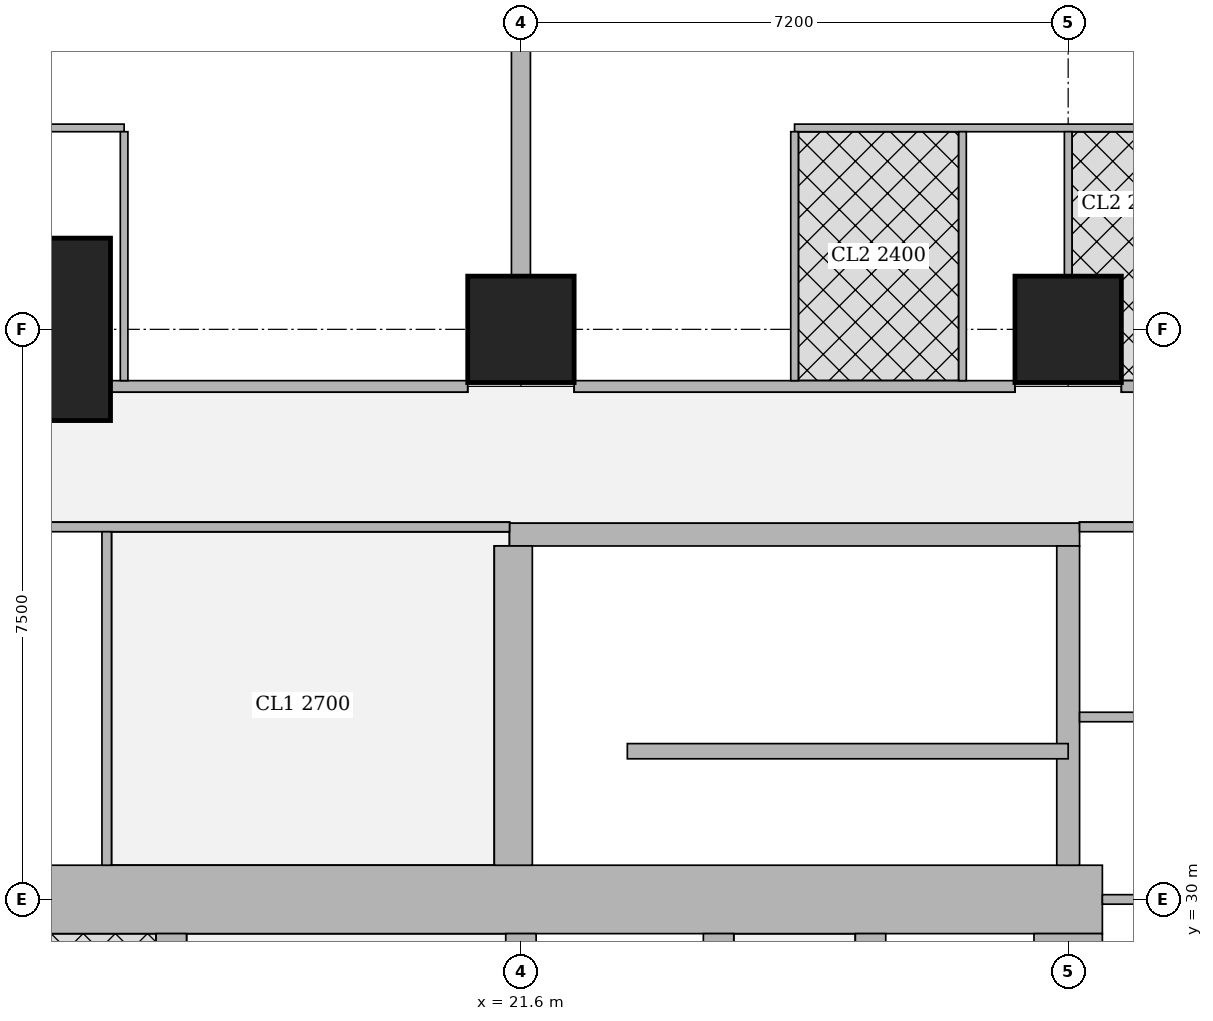
"""IFC4 building model, lengths in metres.
Left out: names, types, materials, properties, quantities, classifications, styles, units other than length and angle.
Written with IfcOpenShell. Run it as: python <this file> out.ifc"""

import sys

from ifc_helpers import new_model, si_unit, direction, frame, frame_2d, origin, origin_2d, place, context, subcontext, project, spatial, rectangle, extrude, element, fill, save


model = new_model("IFC4")
c1 = context("Model", 3, precision=1e-05, world=origin(), true_north=direction((0.0, 1.0)))
c2 = subcontext(c1, "Body", "Model", "MODEL_VIEW")
j1 = project(units=[si_unit("LENGTHUNIT", "METRE"), si_unit("PLANEANGLEUNIT", "RADIAN")], contexts=[c1])
p1 = place(None, origin())
s1 = spatial("IfcSite", under=j1, at=p1, CompositionType="ELEMENT")
p2 = place(p1, origin())
s2 = spatial("IfcBuilding", under=s1, at=p2, CompositionType="ELEMENT")
p3 = place(p2, frame((0.0, 0.0, 234.95)))
s3 = spatial("IfcBuildingStorey", under=s2, at=p3, CompositionType="ELEMENT", Elevation=234.95)
p4 = place(p3, frame((15.0, 37.5, 0.0), z_axis=(0.0, 0.0, 1.0), x_axis=(1.0, 0.0, 0.0)))
e1 = element("IfcColumn", 1, at=p4, inside=s3, PredefinedType="COLUMN", context=c2, shape_type="SweptSolid", body=[
    extrude(rectangle(XDim=2.4, YDim=2.4, at=origin_2d()), origin(), (0.0, 0.0, 1.0), 3.75),
])
for number, where, z_axis, x_axis in (
    (2, (21.6, 37.5, 0.0), (0.0, 0.0, 1.0), (1.0, 0.0, 0.0)),
    (3, (28.8, 37.5, 0.0), (0.0, 0.0, 1.0), (1.0, 0.0, 0.0)),
):
    element("IfcColumn", number, at=place(p3, frame(where, z_axis=z_axis, x_axis=x_axis)), inside=s3, PredefinedType="COLUMN", context=c2, shape_type="SweptSolid", body=[
        extrude(rectangle(XDim=1.4, YDim=1.4, at=origin_2d()), origin(), (0.0, 0.0, 1.0), 3.75),
    ])
p5 = place(p3, frame((13.95, 30.0, 0.0), z_axis=(0.0, 0.0, 1.0), x_axis=(1.0, 0.0, 0.0)))
e4 = element("IfcWall", 4, at=p5, inside=s3, PredefinedType="SHEAR", context=c2, shape_type="SweptSolid", body=[
    extrude(rectangle(XDim=15.3, YDim=0.9, at=frame_2d((7.65, 0.0))), origin(), (0.0, 0.0, 1.0), 3.75),
])
p6 = place(p5, frame((4.45, 0.0, 0.0)))
e5 = element("IfcOpeningElement", 5, at=p6, cuts=e4, PredefinedType="OPENING", context=c2, shape_type="SweptSolid", body=[
    extrude(rectangle(XDim=1.8, YDim=2.1, at=frame_2d((0.9, 1.05))), frame((0.0, 0.46, 0.0), z_axis=(0.0, -1.0, 0.0), x_axis=(1.0, 0.0, 0.0)), (0.0, 0.0, 1.0), 0.92),
])
p7 = place(p5, frame((10.7, 0.0, 0.0)))
e6 = element("IfcOpeningElement", 6, at=p7, cuts=e4, PredefinedType="OPENING", context=c2, shape_type="SweptSolid", body=[
    extrude(rectangle(XDim=1.1, YDim=2.1, at=frame_2d((0.55, 1.05))), frame((0.0, 0.46, 0.0), z_axis=(0.0, -1.0, 0.0), x_axis=(1.0, 0.0, 0.0)), (0.0, 0.0, 1.0), 0.92),
])
p8 = place(p3, frame((28.8, 15.45, 0.0), z_axis=(0.0, 0.0, 1.0), x_axis=(0.0, 1.0, 0.0)))
e7 = element("IfcWall", 7, at=p8, inside=s3, PredefinedType="SHEAR", context=c2, shape_type="SweptSolid", body=[
    extrude(rectangle(XDim=14.1, YDim=0.9, at=frame_2d((7.05, 0.0))), origin(), (0.0, 0.0, 1.0), 3.75),
])
p9 = place(p3, frame((17.0, 15.45, 0.0), z_axis=(0.0, 0.0, 1.0), x_axis=(0.0, 1.0, 0.0)))
e8 = element("IfcWall", 8, at=p9, inside=s3, PredefinedType="SHEAR", context=c2, shape_type="SweptSolid", body=[
    extrude(rectangle(XDim=14.1, YDim=0.4, at=frame_2d((7.05, 0.0))), origin(), (0.0, 0.0, 1.0), 3.75),
])
p10 = place(p9, frame((1.05, 0.0, 0.0)))
e9 = element("IfcOpeningElement", 9, at=p10, cuts=e8, PredefinedType="OPENING", context=c2, shape_type="SweptSolid", body=[
    extrude(rectangle(XDim=1.0, YDim=2.1, at=frame_2d((0.5, 1.05))), frame((0.0, 0.21, 0.0), z_axis=(0.0, -1.0, 0.0), x_axis=(1.0, 0.0, 0.0)), (0.0, 0.0, 1.0), 0.42),
])
p11 = place(p9, frame((4.675, 0.0, 0.0)))
e10 = element("IfcOpeningElement", 10, at=p11, cuts=e8, PredefinedType="OPENING", context=c2, shape_type="SweptSolid", body=[
    extrude(rectangle(XDim=1.0, YDim=2.1, at=frame_2d((0.5, 1.05))), frame((0.0, 0.21, 0.0), z_axis=(0.0, -1.0, 0.0), x_axis=(1.0, 0.0, 0.0)), (0.0, 0.0, 1.0), 0.42),
])
p12 = place(p9, frame((8.425, 0.0, 0.0)))
e11 = element("IfcOpeningElement", 11, at=p12, cuts=e8, PredefinedType="OPENING", context=c2, shape_type="SweptSolid", body=[
    extrude(rectangle(XDim=1.0, YDim=2.1, at=frame_2d((0.5, 1.05))), frame((0.0, 0.21, 0.0), z_axis=(0.0, -1.0, 0.0), x_axis=(1.0, 0.0, 0.0)), (0.0, 0.0, 1.0), 0.42),
])
p13 = place(p9, frame((12.175, 0.0, 0.0)))
e12 = element("IfcOpeningElement", 12, at=p13, cuts=e8, PredefinedType="OPENING", context=c2, shape_type="SweptSolid", body=[
    extrude(rectangle(XDim=1.0, YDim=2.1, at=frame_2d((0.5, 1.05))), frame((0.0, 0.21, 0.0), z_axis=(0.0, -1.0, 0.0), x_axis=(1.0, 0.0, 0.0)), (0.0, 0.0, 1.0), 0.42),
])
p14 = place(p3, frame((21.6, 15.45, 0.0), z_axis=(0.0, 0.0, 1.0), x_axis=(0.0, 1.0, 0.0)))
e13 = element("IfcWall", 13, at=p14, inside=s3, PredefinedType="SHEAR", context=c2, shape_type="SweptSolid", body=[
    extrude(rectangle(XDim=14.1, YDim=0.4, at=frame_2d((7.05, 0.0))), origin(), (0.0, 0.0, 1.0), 3.75),
])
p15 = place(p14, frame((0.875, 0.0, 0.0)))
e14 = element("IfcOpeningElement", 14, at=p15, cuts=e13, PredefinedType="OPENING", context=c2, shape_type="SweptSolid", body=[
    extrude(rectangle(XDim=1.1, YDim=2.1, at=frame_2d((0.55, 1.05))), frame((0.0, 0.21, 0.0), z_axis=(0.0, -1.0, 0.0), x_axis=(1.0, 0.0, 0.0)), (0.0, 0.0, 1.0), 0.42),
])
p16 = place(p14, frame((4.625, 0.0, 0.0)))
e15 = element("IfcOpeningElement", 15, at=p16, cuts=e13, PredefinedType="OPENING", context=c2, shape_type="SweptSolid", body=[
    extrude(rectangle(XDim=1.1, YDim=2.1, at=frame_2d((0.55, 1.05))), frame((0.0, 0.21, 0.0), z_axis=(0.0, -1.0, 0.0), x_axis=(1.0, 0.0, 0.0)), (0.0, 0.0, 1.0), 0.42),
])
p17 = place(p14, frame((8.375, 0.0, 0.0)))
e16 = element("IfcOpeningElement", 16, at=p17, cuts=e13, PredefinedType="OPENING", context=c2, shape_type="SweptSolid", body=[
    extrude(rectangle(XDim=1.1, YDim=2.1, at=frame_2d((0.55, 1.05))), frame((0.0, 0.21, 0.0), z_axis=(0.0, -1.0, 0.0), x_axis=(1.0, 0.0, 0.0)), (0.0, 0.0, 1.0), 0.42),
])
p18 = place(p14, frame((12.125, 0.0, 0.0)))
e17 = element("IfcOpeningElement", 17, at=p18, cuts=e13, PredefinedType="OPENING", context=c2, shape_type="SweptSolid", body=[
    extrude(rectangle(XDim=1.1, YDim=2.1, at=frame_2d((0.55, 1.05))), frame((0.0, 0.21, 0.0), z_axis=(0.0, -1.0, 0.0), x_axis=(1.0, 0.0, 0.0)), (0.0, 0.0, 1.0), 0.42),
])
p19 = place(p3, frame((24.2, 15.45, 0.0), z_axis=(0.0, 0.0, 1.0), x_axis=(0.0, 1.0, 0.0)))
e18 = element("IfcWall", 18, at=p19, inside=s3, PredefinedType="SHEAR", context=c2, shape_type="SweptSolid", body=[
    extrude(rectangle(XDim=14.1, YDim=0.4, at=frame_2d((7.05, 0.0))), origin(), (0.0, 0.0, 1.0), 3.75),
])
p20 = place(p3, frame((26.2, 26.45, 0.0), z_axis=(0.0, 0.0, 1.0), x_axis=(0.0, 1.0, 0.0)))
e19 = element("IfcWall", 19, at=p20, inside=s3, PredefinedType="SHEAR", context=c2, shape_type="SweptSolid", body=[
    extrude(rectangle(XDim=3.1, YDim=0.4, at=frame_2d((1.55, 0.0))), origin(), (0.0, 0.0, 1.0), 3.75),
])
p21 = place(p20, frame((1.075, 0.0, 0.0)))
e20 = element("IfcOpeningElement", 20, at=p21, cuts=e19, PredefinedType="OPENING", context=c2, shape_type="SweptSolid", body=[
    extrude(rectangle(XDim=1.2, YDim=2.1, at=frame_2d((0.6, 1.05))), frame((0.0, 0.21, 0.0), z_axis=(0.0, -1.0, 0.0), x_axis=(1.0, 0.0, 0.0)), (0.0, 0.0, 1.0), 0.42),
])
p22 = place(p3, frame((21.45, 34.8, 0.0), z_axis=(0.0, 0.0, 1.0), x_axis=(1.0, 0.0, 0.0)))
e21 = element("IfcWall", 21, at=p22, inside=s3, PredefinedType="SHEAR", context=c2, shape_type="SweptSolid", body=[
    extrude(rectangle(XDim=7.5, YDim=0.3, at=frame_2d((3.75, 0.0))), origin(), (0.0, 0.0, 1.0), 3.75),
])
p23 = place(p22, frame((0.5, 0.0, 0.0)))
e22 = element("IfcOpeningElement", 22, at=p23, cuts=e21, PredefinedType="OPENING", context=c2, shape_type="SweptSolid", body=[
    extrude(rectangle(XDim=1.1, YDim=2.1, at=frame_2d((0.55, 1.05))), frame((0.0, 0.16, 0.0), z_axis=(0.0, -1.0, 0.0), x_axis=(1.0, 0.0, 0.0)), (0.0, 0.0, 1.0), 0.32),
])
p24 = place(p3, frame((21.5, 30.45, 0.0), z_axis=(0.0, 0.0, 1.0), x_axis=(0.0, 1.0, 0.0)))
e23 = element("IfcWall", 23, at=p24, inside=s3, PredefinedType="SHEAR", context=c2, shape_type="SweptSolid", body=[
    extrude(rectangle(XDim=4.2, YDim=0.5, at=frame_2d((2.1, 0.0))), origin(), (0.0, 0.0, 1.0), 3.75),
])
p25 = place(p3, frame((28.8, 30.45, 0.0), z_axis=(0.0, 0.0, 1.0), x_axis=(0.0, 1.0, 0.0)))
e24 = element("IfcWall", 24, at=p25, inside=s3, PredefinedType="SHEAR", context=c2, shape_type="SweptSolid", body=[
    extrude(rectangle(XDim=4.2, YDim=0.3, at=frame_2d((2.1, 0.0))), origin(), (0.0, 0.0, 1.0), 3.75),
])
p26 = place(p3, frame((16.201, 36.75, 0.0), z_axis=(0.0, 0.0, 1.0), x_axis=(1.0, 0.0, 0.0)))
e25 = element("IfcWall", 25, at=p26, inside=s3, PredefinedType="SOLIDWALL", context=c2, shape_type="SweptSolid", body=[
    extrude(rectangle(XDim=4.698, YDim=0.15, at=frame_2d((2.349, 0.0))), origin(), (0.0, 0.0, 1.0), 3.5),
])
p27 = place(p26, frame((0.353, 0.0, 0.0)))
e26 = element("IfcOpeningElement", 26, at=p27, cuts=e25, PredefinedType="OPENING", context=c2, shape_type="SweptSolid", body=[
    extrude(rectangle(XDim=1.0, YDim=2.1, at=frame_2d((0.5, 1.05))), frame((0.0, 0.085, 0.0), z_axis=(0.0, -1.0, 0.0), x_axis=(1.0, 0.0, 0.0)), (0.0, 0.0, 1.0), 0.17),
])
p28 = place(p3, frame((22.301, 36.75, 0.0), z_axis=(0.0, 0.0, 1.0), x_axis=(1.0, 0.0, 0.0)))
e27 = element("IfcWall", 27, at=p28, inside=s3, PredefinedType="SOLIDWALL", context=c2, shape_type="SweptSolid", body=[
    extrude(rectangle(XDim=5.798, YDim=0.15, at=frame_2d((2.899, 0.0))), origin(), (0.0, 0.0, 1.0), 3.5),
])
p29 = place(p28, frame((0.799, 0.0, 0.0)))
e28 = element("IfcOpeningElement", 28, at=p29, cuts=e27, PredefinedType="OPENING", context=c2, shape_type="SweptSolid", body=[
    extrude(rectangle(XDim=1.0, YDim=2.1, at=frame_2d((0.5, 1.05))), frame((0.0, 0.085, 0.0), z_axis=(0.0, -1.0, 0.0), x_axis=(1.0, 0.0, 0.0)), (0.0, 0.0, 1.0), 0.17),
])
p30 = place(p3, frame((29.501, 36.75, 0.0), z_axis=(0.0, 0.0, 1.0), x_axis=(1.0, 0.0, 0.0)))
e29 = element("IfcWall", 29, at=p30, inside=s3, PredefinedType="SOLIDWALL", context=c2, shape_type="SweptSolid", body=[
    extrude(rectangle(XDim=5.471, YDim=0.15, at=frame_2d((2.735, 0.0))), origin(), (0.0, 0.0, 1.0), 3.5),
])
p31 = place(p3, frame((13.75, 40.15, 0.0), z_axis=(0.0, 0.0, 1.0), x_axis=(1.0, 0.0, 0.0)))
e30 = element("IfcWall", 30, at=p31, inside=s3, PredefinedType="PARTITIONING", context=c2, shape_type="SweptSolid", body=[
    extrude(rectangle(XDim=2.629, YDim=0.1, at=frame_2d((1.314, 0.0))), origin(), (0.0, 0.0, 1.0), 2.05),
])
p32 = place(p3, frame((16.379, 36.825, 0.0), z_axis=(0.0, 0.0, 1.0), x_axis=(0.0, 1.0, 0.0)))
e31 = element("IfcWall", 31, at=p32, inside=s3, PredefinedType="PARTITIONING", context=c2, shape_type="SweptSolid", body=[
    extrude(rectangle(XDim=3.275, YDim=0.1, at=frame_2d((1.638, 0.0))), origin(), (0.0, 0.0, 1.0), 3.5),
])
p33 = place(p32, frame((2.225, 0.0, 0.0)))
e32 = element("IfcOpeningElement", 32, at=p33, cuts=e31, PredefinedType="OPENING", context=c2, shape_type="SweptSolid", body=[
    extrude(rectangle(XDim=0.9, YDim=2.1, at=frame_2d((0.45, 1.05))), frame((0.0, 0.06, 0.0), z_axis=(0.0, -1.0, 0.0), x_axis=(1.0, 0.0, 0.0)), (0.0, 0.0, 1.0), 0.12),
])
p34 = place(p3, frame((25.2, 40.15, 0.0), z_axis=(0.0, 0.0, 1.0), x_axis=(1.0, 0.0, 0.0)))
e33 = element("IfcWall", 33, at=p34, inside=s3, PredefinedType="PARTITIONING", context=c2, shape_type="SweptSolid", body=[
    extrude(rectangle(XDim=9.135, YDim=0.1, at=frame_2d((4.567, 0.0))), origin(), (0.0, 0.0, 1.0), 3.5),
])
p35 = place(p34, frame((0.655, 0.0, 0.0)))
e34 = element("IfcOpeningElement", 34, at=p35, cuts=e33, PredefinedType="OPENING", context=c2, shape_type="SweptSolid", body=[
    extrude(rectangle(XDim=0.9, YDim=2.1, at=frame_2d((0.45, 1.05))), frame((0.0, 0.06, 0.0), z_axis=(0.0, -1.0, 0.0), x_axis=(1.0, 0.0, 0.0)), (0.0, 0.0, 1.0), 0.12),
])
p36 = place(p34, frame((3.95, 0.0, 0.0)))
e35 = element("IfcOpeningElement", 35, at=p36, cuts=e33, PredefinedType="OPENING", context=c2, shape_type="SweptSolid", body=[
    extrude(rectangle(XDim=0.9, YDim=2.1, at=frame_2d((0.45, 1.05))), frame((0.0, 0.06, 0.0), z_axis=(0.0, -1.0, 0.0), x_axis=(1.0, 0.0, 0.0)), (0.0, 0.0, 1.0), 0.12),
])
p37 = place(p34, frame((8.081, 0.0, 0.0)))
e36 = element("IfcOpeningElement", 36, at=p37, cuts=e33, PredefinedType="OPENING", context=c2, shape_type="SweptSolid", body=[
    extrude(rectangle(XDim=0.9, YDim=2.1, at=frame_2d((0.45, 1.05))), frame((0.0, 0.06, 0.0), z_axis=(0.0, -1.0, 0.0), x_axis=(1.0, 0.0, 0.0)), (0.0, 0.0, 1.0), 0.12),
])
p38 = place(p34, frame((2.455, 0.0, 0.0)))
e37 = element("IfcOpeningElement", 37, at=p38, cuts=e33, PredefinedType="OPENING", context=c2, shape_type="SweptSolid", body=[
    extrude(rectangle(XDim=0.9, YDim=2.1, at=frame_2d((0.45, 1.05))), frame((0.0, 0.06, 0.0), z_axis=(0.0, -1.0, 0.0), x_axis=(1.0, 0.0, 0.0)), (0.0, 0.0, 1.0), 0.12),
])
p39 = place(p34, frame((5.75, 0.0, 0.0)))
e38 = element("IfcOpeningElement", 38, at=p39, cuts=e33, PredefinedType="OPENING", context=c2, shape_type="SweptSolid", body=[
    extrude(rectangle(XDim=0.9, YDim=2.1, at=frame_2d((0.45, 1.05))), frame((0.0, 0.06, 0.0), z_axis=(0.0, -1.0, 0.0), x_axis=(1.0, 0.0, 0.0)), (0.0, 0.0, 1.0), 0.12),
])
p40 = place(p3, frame((25.2, 36.825, 0.0), z_axis=(0.0, 0.0, 1.0), x_axis=(0.0, 1.0, 0.0)))
e39 = element("IfcWall", 39, at=p40, inside=s3, PredefinedType="PARTITIONING", context=c2, shape_type="SweptSolid", body=[
    extrude(rectangle(XDim=3.275, YDim=0.1, at=frame_2d((1.638, 0.0))), origin(), (0.0, 0.0, 1.0), 3.5),
])
p41 = place(p3, frame((28.8, 38.201, 0.0), z_axis=(0.0, 0.0, 1.0), x_axis=(0.0, 1.0, 0.0)))
e40 = element("IfcWall", 40, at=p41, inside=s3, PredefinedType="PARTITIONING", context=c2, shape_type="SweptSolid", body=[
    extrude(rectangle(XDim=1.899, YDim=0.1, at=frame_2d((0.95, 0.0))), origin(), (0.0, 0.0, 1.0), 3.5),
])
p42 = place(p3, frame((27.41, 36.825, 0.0), z_axis=(0.0, 0.0, 1.0), x_axis=(0.0, 1.0, 0.0)))
e41 = element("IfcWall", 41, at=p42, inside=s3, PredefinedType="PARTITIONING", context=c2, shape_type="SweptSolid", body=[
    extrude(rectangle(XDim=3.275, YDim=0.1, at=frame_2d((1.638, 0.0))), origin(), (0.0, 0.0, 1.0), 3.5),
])
p43 = place(p3, frame((21.6, 38.201, 0.0), z_axis=(0.0, 0.0, 1.0), x_axis=(0.0, 1.0, 0.0)))
e42 = element("IfcWall", 42, at=p43, inside=s3, PredefinedType="SOLIDWALL", context=c2, shape_type="SweptSolid", body=[
    extrude(rectangle(XDim=3.149, YDim=0.25, at=frame_2d((1.575, 0.0))), origin(), (0.0, 0.0, 1.0), 3.5),
])
p44 = place(p3, frame((13.75, 34.9, 0.0), z_axis=(0.0, 0.0, 1.0), x_axis=(1.0, 0.0, 0.0)))
e43 = element("IfcWall", 43, at=p44, inside=s3, PredefinedType="PARTITIONING", context=c2, shape_type="SweptSolid", body=[
    extrude(rectangle(XDim=7.7, YDim=0.125, at=frame_2d((3.85, 0.0))), origin(), (0.0, 0.0, 1.0), 3.5),
])
p45 = place(p44, frame((4.15, 0.0, 0.0)))
e44 = element("IfcOpeningElement", 44, at=p45, cuts=e43, PredefinedType="OPENING", context=c2, shape_type="SweptSolid", body=[
    extrude(rectangle(XDim=1.8, YDim=2.1, at=frame_2d((0.9, 1.05))), frame((0.0, 0.073, 0.0), z_axis=(0.0, -1.0, 0.0), x_axis=(1.0, 0.0, 0.0)), (0.0, 0.0, 1.0), 0.145),
])
p46 = place(p3, frame((16.15, 30.45, 0.0), z_axis=(0.0, 0.0, 1.0), x_axis=(0.0, 1.0, 0.0)))
e45 = element("IfcWall", 45, at=p46, inside=s3, PredefinedType="PARTITIONING", context=c2, shape_type="SweptSolid", body=[
    extrude(rectangle(XDim=4.387, YDim=0.125, at=frame_2d((2.193, 0.0))), origin(), (0.0, 0.0, 1.0), 3.5),
])
p47 = place(p46, frame((1.75, 0.0, 0.0)))
e46 = element("IfcOpeningElement", 46, at=p47, cuts=e45, PredefinedType="OPENING", context=c2, shape_type="SweptSolid", body=[
    extrude(rectangle(XDim=1.0, YDim=2.1, at=frame_2d((0.5, 1.05))), frame((0.0, 0.073, 0.0), z_axis=(0.0, -1.0, 0.0), x_axis=(1.0, 0.0, 0.0)), (0.0, 0.0, 1.0), 0.145),
])
p48 = place(p3, frame((28.95, 34.9, 0.0), z_axis=(0.0, 0.0, 1.0), x_axis=(1.0, 0.0, 0.0)))
e47 = element("IfcWall", 47, at=p48, inside=s3, PredefinedType="PARTITIONING", context=c2, shape_type="SweptSolid", body=[
    extrude(rectangle(XDim=4.588, YDim=0.125, at=frame_2d((2.294, 0.0))), origin(), (0.0, 0.0, 1.0), 3.5),
])
p49 = place(p3, frame((29.25, 30.0, 0.0), z_axis=(0.0, 0.0, 1.0), x_axis=(1.0, 0.0, 0.0)))
e48 = element("IfcWall", 48, at=p49, inside=s3, PredefinedType="PARTITIONING", context=c2, shape_type="SweptSolid", body=[
    extrude(rectangle(XDim=3.049, YDim=0.125, at=frame_2d((1.524, 0.0))), origin(), (0.0, 0.0, 1.0), 3.5),
])
p50 = place(p3, frame((28.95, 32.4, 0.0), z_axis=(0.0, 0.0, 1.0), x_axis=(1.0, 0.0, 0.0)))
e49 = element("IfcWall", 49, at=p50, inside=s3, PredefinedType="PARTITIONING", context=c2, shape_type="SweptSolid", body=[
    extrude(rectangle(XDim=4.976, YDim=0.125, at=frame_2d((2.488, 0.0))), origin(), (0.0, 0.0, 1.0), 3.5),
])
p51 = place(p3, frame((23.0, 31.95, 0.0), z_axis=(0.0, 0.0, 1.0), x_axis=(1.0, 0.0, 0.0)))
e50 = element("IfcWall", 50, at=p51, inside=s3, PredefinedType="SHEAR", context=c2, shape_type="SweptSolid", body=[
    extrude(rectangle(XDim=5.8, YDim=0.2, at=frame_2d((2.9, 0.0))), origin(), (0.0, 0.0, 1.0), 3.75),
])
p52 = place(p33, origin())
e51 = element("IfcDoor", 51, at=p52, inside=s3, OperationType="SINGLE_SWING_RIGHT", PredefinedType="DOOR", context=c2, shape_type="SweptSolid", body=[
    extrude(rectangle(XDim=0.9, YDim=2.1, at=frame_2d((0.45, 1.05))), frame((0.0, 0.025, 0.0), z_axis=(0.0, -1.0, 0.0), x_axis=(1.0, 0.0, 0.0)), (0.0, 0.0, 1.0), 0.05),
])
fill(e32, e51)
p53 = place(p27, origin())
e52 = element("IfcDoor", 52, at=p53, inside=s3, OperationType="SINGLE_SWING_LEFT", PredefinedType="DOOR", context=c2, shape_type="SweptSolid", body=[
    extrude(rectangle(XDim=1.0, YDim=2.1, at=frame_2d((0.5, 1.05))), frame((0.0, 0.025, 0.0), z_axis=(0.0, -1.0, 0.0), x_axis=(1.0, 0.0, 0.0)), (0.0, 0.0, 1.0), 0.05),
])
fill(e26, e52)
p54 = place(p35, origin())
e53 = element("IfcDoor", 53, at=p54, inside=s3, OperationType="SINGLE_SWING_RIGHT", PredefinedType="DOOR", context=c2, shape_type="SweptSolid", body=[
    extrude(rectangle(XDim=0.9, YDim=2.1, at=frame_2d((0.45, 1.05))), frame((0.0, 0.025, 0.0), z_axis=(0.0, -1.0, 0.0), x_axis=(1.0, 0.0, 0.0)), (0.0, 0.0, 1.0), 0.05),
])
fill(e34, e53)
p55 = place(p36, origin())
e54 = element("IfcDoor", 54, at=p55, inside=s3, OperationType="SINGLE_SWING_RIGHT", PredefinedType="DOOR", context=c2, shape_type="SweptSolid", body=[
    extrude(rectangle(XDim=0.9, YDim=2.1, at=frame_2d((0.45, 1.05))), frame((0.0, 0.025, 0.0), z_axis=(0.0, -1.0, 0.0), x_axis=(1.0, 0.0, 0.0)), (0.0, 0.0, 1.0), 0.05),
])
fill(e35, e54)
p56 = place(p38, origin())
e55 = element("IfcDoor", 55, at=p56, inside=s3, OperationType="SINGLE_SWING_LEFT", PredefinedType="DOOR", context=c2, shape_type="SweptSolid", body=[
    extrude(rectangle(XDim=0.9, YDim=2.1, at=frame_2d((0.45, 1.05))), frame((0.0, 0.025, 0.0), z_axis=(0.0, -1.0, 0.0), x_axis=(1.0, 0.0, 0.0)), (0.0, 0.0, 1.0), 0.05),
])
fill(e37, e55)
p57 = place(p29, origin())
e56 = element("IfcDoor", 56, at=p57, inside=s3, OperationType="SINGLE_SWING_LEFT", PredefinedType="DOOR", context=c2, shape_type="SweptSolid", body=[
    extrude(rectangle(XDim=1.0, YDim=2.1, at=frame_2d((0.5, 1.05))), frame((0.0, 0.025, 0.0), z_axis=(0.0, -1.0, 0.0), x_axis=(1.0, 0.0, 0.0)), (0.0, 0.0, 1.0), 0.05),
])
fill(e28, e56)
p58 = place(p47, origin())
e57 = element("IfcDoor", 57, at=p58, inside=s3, OperationType="SINGLE_SWING_RIGHT", PredefinedType="DOOR", context=c2, shape_type="SweptSolid", body=[
    extrude(rectangle(XDim=1.0, YDim=2.1, at=frame_2d((0.5, 1.05))), frame((0.0, 0.025, 0.0), z_axis=(0.0, -1.0, 0.0), x_axis=(1.0, 0.0, 0.0)), (0.0, 0.0, 1.0), 0.05),
])
fill(e46, e57)
p59 = place(p45, origin())
e58 = element("IfcDoor", 58, at=p59, inside=s3, OperationType="DOUBLE_DOOR_SINGLE_SWING", PredefinedType="DOOR", context=c2, shape_type="SweptSolid", body=[
    extrude(rectangle(XDim=1.8, YDim=2.1, at=frame_2d((0.9, 1.05))), frame((0.0, 0.025, 0.0), z_axis=(0.0, -1.0, 0.0), x_axis=(1.0, 0.0, 0.0)), (0.0, 0.0, 1.0), 0.05),
])
fill(e44, e58)
p60 = place(p6, origin())
e59 = element("IfcDoor", 59, at=p60, inside=s3, OperationType="DOUBLE_DOOR_SINGLE_SWING", PredefinedType="DOOR", context=c2, shape_type="SweptSolid", body=[
    extrude(rectangle(XDim=1.8, YDim=2.1, at=frame_2d((0.9, 1.05))), frame((0.0, 0.025, 0.0), z_axis=(0.0, -1.0, 0.0), x_axis=(1.0, 0.0, 0.0)), (0.0, 0.0, 1.0), 0.05),
])
fill(e5, e59)
p61 = place(p7, origin())
e60 = element("IfcDoor", 60, at=p61, inside=s3, OperationType="SINGLE_SWING_LEFT", PredefinedType="DOOR", context=c2, shape_type="SweptSolid", body=[
    extrude(rectangle(XDim=1.1, YDim=2.1, at=frame_2d((0.55, 1.05))), frame((0.0, 0.025, 0.0), z_axis=(0.0, -1.0, 0.0), x_axis=(1.0, 0.0, 0.0)), (0.0, 0.0, 1.0), 0.05),
])
fill(e6, e60)
p62 = place(p23, origin())
e61 = element("IfcDoor", 61, at=p62, inside=s3, OperationType="SINGLE_SWING_RIGHT", PredefinedType="DOOR", context=c2, shape_type="SweptSolid", body=[
    extrude(rectangle(XDim=1.1, YDim=2.1, at=frame_2d((0.55, 1.05))), frame((0.0, 0.025, 0.0), z_axis=(0.0, -1.0, 0.0), x_axis=(1.0, 0.0, 0.0)), (0.0, 0.0, 1.0), 0.05),
])
fill(e22, e61)
save(model, sys.argv[1])
